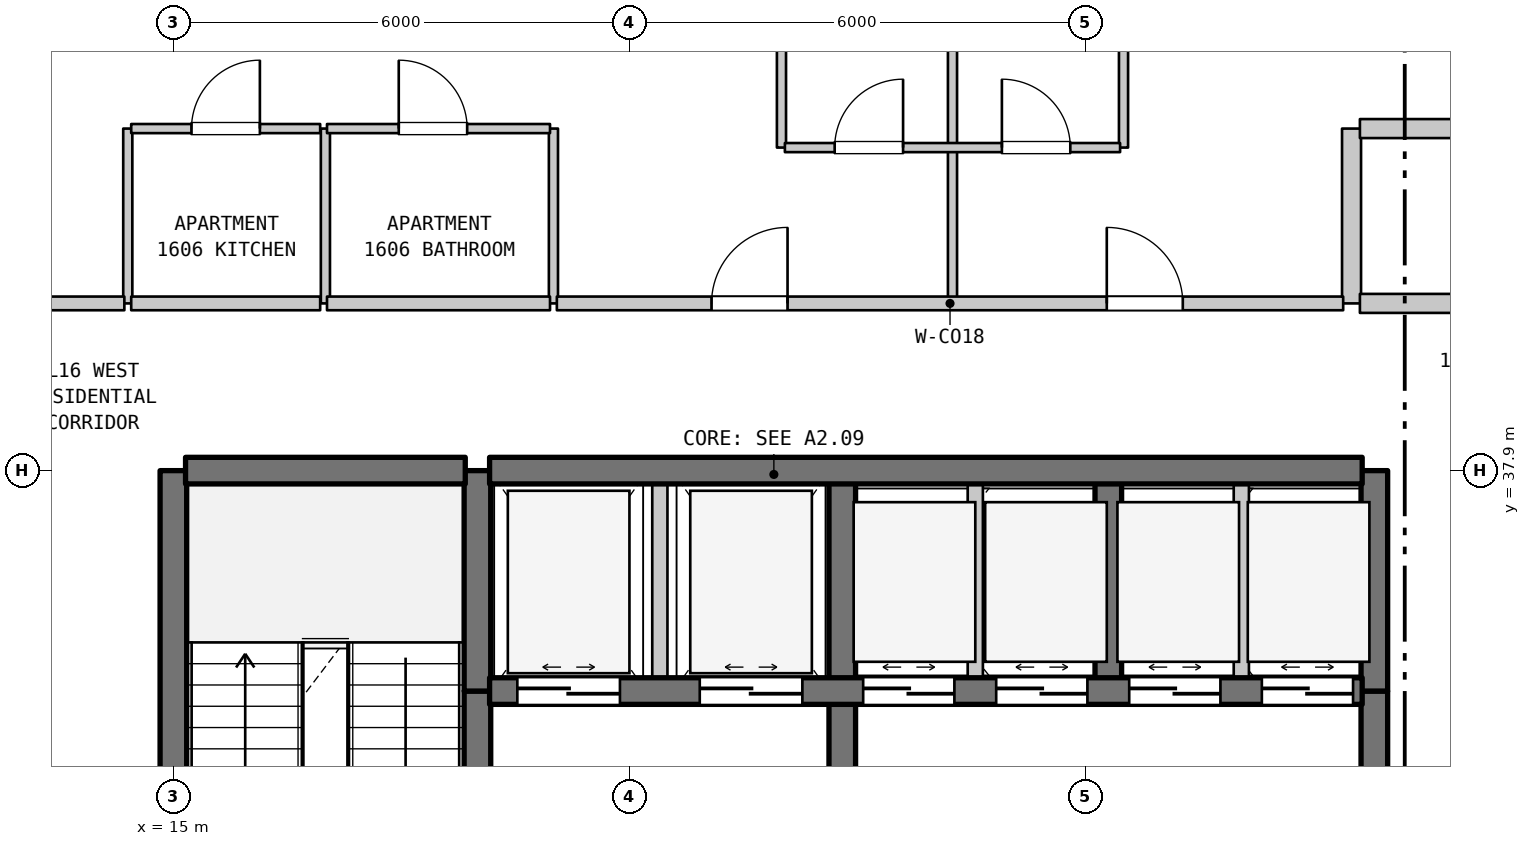
"""IFC4 building model, lengths in metres.
Left out: names, types, materials, properties, quantities, classifications, styles, units other than length and angle.
Written with IfcOpenShell. Run it as: python <this file> out.ifc"""

import sys

from ifc_helpers import new_model, si_unit, direction, frame, frame_2d, origin, place, context, subcontext, project, spatial, rectangle, extrude, element, fill, save


model = new_model("IFC4")
c1 = context("Model", 3, precision=1e-05, world=origin(), true_north=direction((0.0, 1.0)))
c2 = subcontext(c1, "Body", "Model", "MODEL_VIEW")
j1 = project(units=[si_unit("LENGTHUNIT", "METRE"), si_unit("PLANEANGLEUNIT", "RADIAN")], contexts=[c1])
p1 = place(None, origin())
s1 = spatial("IfcSite", under=j1, at=p1, CompositionType="ELEMENT")
p2 = place(p1, origin())
s2 = spatial("IfcBuilding", under=s1, at=p2, CompositionType="ELEMENT")
p3 = place(p2, frame((0.0, 0.0, 70.1)))
s3 = spatial("IfcBuildingStorey", under=s2, at=p3, CompositionType="ELEMENT", Elevation=70.1)
p4 = place(p3, frame((14.4, 40.1, 0.0), z_axis=(0.0, 0.0, 1.0), x_axis=(0.0, 1.0, 0.0)))
e1 = element("IfcWall", 1, at=p4, inside=s3, PredefinedType="PARTITIONING", context=c2, shape_type="SweptSolid", body=[
    extrude(rectangle(XDim=2.3, YDim=0.12, at=frame_2d((1.15, 0.0))), origin(), (0.0, 0.0, 1.0), 3.385),
])
p5 = place(p3, frame((15.0, 31.1, 0.0), z_axis=(0.0, 0.0, 1.0), x_axis=(0.0, 1.0, 0.0)))
e2 = element("IfcWall", 2, at=p5, inside=s3, PredefinedType="SHEAR", context=c2, shape_type="SweptSolid", body=[
    extrude(rectangle(XDim=6.8, YDim=0.35, at=frame_2d((3.4, 0.0))), origin(), (0.0, 0.0, 1.0), 3.385),
])
p6 = place(p3, frame((17.0, 40.1, 0.0), z_axis=(0.0, 0.0, 1.0), x_axis=(0.0, 1.0, 0.0)))
e3 = element("IfcWall", 3, at=p6, inside=s3, PredefinedType="PARTITIONING", context=c2, shape_type="SweptSolid", body=[
    extrude(rectangle(XDim=2.3, YDim=0.12, at=frame_2d((1.15, 0.0))), origin(), (0.0, 0.0, 1.0), 3.385),
])
p7 = place(p3, frame((19.0, 29.5, 0.0), z_axis=(0.0, 0.0, 1.0), x_axis=(0.0, 1.0, 0.0)))
e4 = element("IfcWall", 4, at=p7, inside=s3, PredefinedType="SHEAR", context=c2, shape_type="SweptSolid", body=[
    extrude(rectangle(XDim=5.5, YDim=0.35, at=frame_2d((2.75, 0.0))), origin(), (0.0, 0.0, 1.0), 3.385),
])
p8 = place(p7, frame((2.025, 0.0, 0.0)))
e5 = element("IfcOpeningElement", 5, at=p8, cuts=e4, PredefinedType="OPENING", context=c2, shape_type="SweptSolid", body=[
    extrude(rectangle(XDim=1.1, YDim=2.15, at=frame_2d((0.55, 1.075))), frame((0.0, 0.185, 0.0), z_axis=(0.0, -1.0, 0.0), x_axis=(1.0, 0.0, 0.0)), (0.0, 0.0, 1.0), 0.37),
])
p9 = place(p3, frame((19.0, 35.0, 0.0), z_axis=(0.0, 0.0, 1.0), x_axis=(0.0, 1.0, 0.0)))
e6 = element("IfcWall", 6, at=p9, inside=s3, PredefinedType="SHEAR", context=c2, shape_type="SweptSolid", body=[
    extrude(rectangle(XDim=2.9, YDim=0.35, at=frame_2d((1.45, 0.0))), origin(), (0.0, 0.0, 1.0), 3.385),
])
p10 = place(p3, frame((20.0, 40.1, 0.0), z_axis=(0.0, 0.0, 1.0), x_axis=(0.0, 1.0, 0.0)))
e7 = element("IfcWall", 7, at=p10, inside=s3, PredefinedType="PARTITIONING", context=c2, shape_type="SweptSolid", body=[
    extrude(rectangle(XDim=2.3, YDim=0.12, at=frame_2d((1.15, 0.0))), origin(), (0.0, 0.0, 1.0), 3.385),
])
p11 = place(p3, frame((21.4, 35.0, 0.0), z_axis=(0.0, 0.0, 1.0), x_axis=(0.0, 1.0, 0.0)))
e8 = element("IfcWall", 8, at=p11, inside=s3, PredefinedType="STANDARD", context=c2, shape_type="SweptSolid", body=[
    extrude(rectangle(XDim=2.9, YDim=0.2, at=frame_2d((1.45, 0.0))), origin(), (0.0, 0.0, 1.0), 3.385),
])
p12 = place(p3, frame((23.0, 42.15, 0.0), z_axis=(0.0, 0.0, 1.0), x_axis=(0.0, 1.0, 0.0)))
e9 = element("IfcWall", 9, at=p12, inside=s3, PredefinedType="PARTITIONING", context=c2, shape_type="SweptSolid", body=[
    extrude(rectangle(XDim=11.74, YDim=0.12, at=frame_2d((5.87, 0.0))), origin(), (0.0, 0.0, 1.0), 3.385),
])
p13 = place(p3, frame((23.8, 31.5, 0.0), z_axis=(0.0, 0.0, 1.0), x_axis=(0.0, 1.0, 0.0)))
e10 = element("IfcWall", 10, at=p13, inside=s3, PredefinedType="SHEAR", context=c2, shape_type="SweptSolid", body=[
    extrude(rectangle(XDim=3.5, YDim=0.35, at=frame_2d((1.75, 0.0))), origin(), (0.0, 0.0, 1.0), 3.385),
])
p14 = place(p13, frame((1.127, 0.0, 0.0)))
e11 = element("IfcOpeningElement", 11, at=p14, cuts=e10, PredefinedType="OPENING", context=c2, shape_type="SweptSolid", body=[
    extrude(rectangle(XDim=1.1, YDim=2.15, at=frame_2d((0.55, 1.075))), frame((0.0, 0.185, 0.0), z_axis=(0.0, -1.0, 0.0), x_axis=(1.0, 0.0, 0.0)), (0.0, 0.0, 1.0), 0.37),
])
p15 = place(p3, frame((23.8, 35.0, 0.0), z_axis=(0.0, 0.0, 1.0), x_axis=(0.0, 1.0, 0.0)))
e12 = element("IfcWall", 12, at=p15, inside=s3, PredefinedType="SHEAR", context=c2, shape_type="SweptSolid", body=[
    extrude(rectangle(XDim=2.9, YDim=0.35, at=frame_2d((1.45, 0.0))), origin(), (0.0, 0.0, 1.0), 3.385),
])
p16 = place(p3, frame((25.25, 40.1, 0.0), z_axis=(0.0, 0.0, 1.0), x_axis=(0.0, 1.0, 0.0)))
e13 = element("IfcWall", 13, at=p16, inside=s3, PredefinedType="PARTITIONING", context=c2, shape_type="SweptSolid", body=[
    extrude(rectangle(XDim=2.05, YDim=0.12, at=frame_2d((1.025, 0.0))), origin(), (0.0, 0.0, 1.0), 3.385),
])
p17 = place(p3, frame((25.25, 42.15, 0.0), z_axis=(0.0, 0.0, 1.0), x_axis=(0.0, 1.0, 0.0)))
e14 = element("IfcWall", 14, at=p17, inside=s3, PredefinedType="PARTITIONING", context=c2, shape_type="SweptSolid", body=[
    extrude(rectangle(XDim=11.74, YDim=0.12, at=frame_2d((5.87, 0.0))), origin(), (0.0, 0.0, 1.0), 3.385),
])
p18 = place(p3, frame((25.55, 35.0, 0.0), z_axis=(0.0, 0.0, 1.0), x_axis=(0.0, 1.0, 0.0)))
e15 = element("IfcWall", 15, at=p18, inside=s3, PredefinedType="STANDARD", context=c2, shape_type="SweptSolid", body=[
    extrude(rectangle(XDim=2.9, YDim=0.2, at=frame_2d((1.45, 0.0))), origin(), (0.0, 0.0, 1.0), 3.385),
])
p19 = place(p3, frame((27.3, 35.0, 0.0), z_axis=(0.0, 0.0, 1.0), x_axis=(0.0, 1.0, 0.0)))
e16 = element("IfcWall", 16, at=p19, inside=s3, PredefinedType="SHEAR", context=c2, shape_type="SweptSolid", body=[
    extrude(rectangle(XDim=2.9, YDim=0.35, at=frame_2d((1.45, 0.0))), origin(), (0.0, 0.0, 1.0), 3.385),
])
p20 = place(p3, frame((27.5, 42.15, 0.0), z_axis=(0.0, 0.0, 1.0), x_axis=(0.0, 1.0, 0.0)))
e17 = element("IfcWall", 17, at=p20, inside=s3, PredefinedType="PARTITIONING", context=c2, shape_type="SweptSolid", body=[
    extrude(rectangle(XDim=11.74, YDim=0.12, at=frame_2d((5.87, 0.0))), origin(), (0.0, 0.0, 1.0), 3.385),
])
p21 = place(p3, frame((29.05, 35.0, 0.0), z_axis=(0.0, 0.0, 1.0), x_axis=(0.0, 1.0, 0.0)))
e18 = element("IfcWall", 18, at=p21, inside=s3, PredefinedType="STANDARD", context=c2, shape_type="SweptSolid", body=[
    extrude(rectangle(XDim=2.9, YDim=0.2, at=frame_2d((1.45, 0.0))), origin(), (0.0, 0.0, 1.0), 3.385),
])
p22 = place(p3, frame((30.5, 40.1, 0.0), z_axis=(0.0, 0.0, 1.0), x_axis=(0.0, 1.0, 0.0)))
e19 = element("IfcWall", 19, at=p22, inside=s3, PredefinedType="STANDARD", context=c2, shape_type="SweptSolid", body=[
    extrude(rectangle(XDim=2.3, YDim=0.25, at=frame_2d((1.15, 0.0))), origin(), (0.0, 0.0, 1.0), 3.385),
])
p23 = place(p3, frame((30.8, 31.5, 0.0), z_axis=(0.0, 0.0, 1.0), x_axis=(0.0, 1.0, 0.0)))
e20 = element("IfcWall", 20, at=p23, inside=s3, PredefinedType="SHEAR", context=c2, shape_type="SweptSolid", body=[
    extrude(rectangle(XDim=3.5, YDim=0.35, at=frame_2d((1.75, 0.0))), origin(), (0.0, 0.0, 1.0), 3.385),
])
p24 = place(p23, frame((1.15, 0.0, 0.0)))
e21 = element("IfcOpeningElement", 21, at=p24, cuts=e20, PredefinedType="OPENING", context=c2, shape_type="SweptSolid", body=[
    extrude(rectangle(XDim=1.2, YDim=2.2, at=frame_2d((0.6, 1.1))), frame((0.0, 0.185, 0.0), z_axis=(0.0, -1.0, 0.0), x_axis=(1.0, 0.0, 0.0)), (0.0, 0.0, 1.0), 0.37),
])
p25 = place(p3, frame((30.8, 35.0, 0.0), z_axis=(0.0, 0.0, 1.0), x_axis=(0.0, 1.0, 0.0)))
e22 = element("IfcWall", 22, at=p25, inside=s3, PredefinedType="SHEAR", context=c2, shape_type="SweptSolid", body=[
    extrude(rectangle(XDim=2.9, YDim=0.35, at=frame_2d((1.45, 0.0))), origin(), (0.0, 0.0, 1.0), 3.385),
])
p26 = place(p3, frame((19.16, 35.0, 0.0), z_axis=(0.0, 0.0, 1.0), x_axis=(1.0, 0.0, 0.0)))
e23 = element("IfcWall", 23, at=p26, inside=s3, PredefinedType="SHEAR", context=c2, shape_type="SweptSolid", body=[
    extrude(rectangle(XDim=11.48, YDim=0.35, at=frame_2d((5.74, 0.0))), origin(), (0.0, 0.0, 1.0), 3.385),
])
p27 = place(p26, frame((0.365, 0.0, 0.0)))
e24 = element("IfcOpeningElement", 24, at=p27, cuts=e23, PredefinedType="OPENING", context=c2, shape_type="SweptSolid", body=[
    extrude(rectangle(XDim=1.35, YDim=2.2, at=frame_2d((0.675, 1.1))), frame((0.0, 0.185, 0.0), z_axis=(0.0, -1.0, 0.0), x_axis=(1.0, 0.0, 0.0)), (0.0, 0.0, 1.0), 0.37),
])
p28 = place(p26, frame((2.765, 0.0, 0.0)))
e25 = element("IfcOpeningElement", 25, at=p28, cuts=e23, PredefinedType="OPENING", context=c2, shape_type="SweptSolid", body=[
    extrude(rectangle(XDim=1.35, YDim=2.2, at=frame_2d((0.675, 1.1))), frame((0.0, 0.185, 0.0), z_axis=(0.0, -1.0, 0.0), x_axis=(1.0, 0.0, 0.0)), (0.0, 0.0, 1.0), 0.37),
])
p29 = place(p26, frame((4.915, 0.0, 0.0)))
e26 = element("IfcOpeningElement", 26, at=p29, cuts=e23, PredefinedType="OPENING", context=c2, shape_type="SweptSolid", body=[
    extrude(rectangle(XDim=1.2, YDim=2.2, at=frame_2d((0.6, 1.1))), frame((0.0, 0.185, 0.0), z_axis=(0.0, -1.0, 0.0), x_axis=(1.0, 0.0, 0.0)), (0.0, 0.0, 1.0), 0.37),
])
p30 = place(p26, frame((6.665, 0.0, 0.0)))
e27 = element("IfcOpeningElement", 27, at=p30, cuts=e23, PredefinedType="OPENING", context=c2, shape_type="SweptSolid", body=[
    extrude(rectangle(XDim=1.2, YDim=2.2, at=frame_2d((0.6, 1.1))), frame((0.0, 0.185, 0.0), z_axis=(0.0, -1.0, 0.0), x_axis=(1.0, 0.0, 0.0)), (0.0, 0.0, 1.0), 0.37),
])
p31 = place(p26, frame((8.415, 0.0, 0.0)))
e28 = element("IfcOpeningElement", 28, at=p31, cuts=e23, PredefinedType="OPENING", context=c2, shape_type="SweptSolid", body=[
    extrude(rectangle(XDim=1.2, YDim=2.2, at=frame_2d((0.6, 1.1))), frame((0.0, 0.185, 0.0), z_axis=(0.0, -1.0, 0.0), x_axis=(1.0, 0.0, 0.0)), (0.0, 0.0, 1.0), 0.37),
])
p32 = place(p26, frame((10.16, 0.0, 0.0)))
e29 = element("IfcOpeningElement", 29, at=p32, cuts=e23, PredefinedType="OPENING", context=c2, shape_type="SweptSolid", body=[
    extrude(rectangle(XDim=1.2, YDim=2.2, at=frame_2d((0.6, 1.1))), frame((0.0, 0.185, 0.0), z_axis=(0.0, -1.0, 0.0), x_axis=(1.0, 0.0, 0.0)), (0.0, 0.0, 1.0), 0.37),
])
p33 = place(p3, frame((15.16, 37.9, 0.0), z_axis=(0.0, 0.0, 1.0), x_axis=(1.0, 0.0, 0.0)))
e30 = element("IfcWall", 30, at=p33, inside=s3, PredefinedType="SHEAR", context=c2, shape_type="SweptSolid", body=[
    extrude(rectangle(XDim=3.68, YDim=0.35, at=frame_2d((1.84, 0.0))), origin(), (0.0, 0.0, 1.0), 3.385),
])
p34 = place(p3, frame((19.16, 37.9, 0.0), z_axis=(0.0, 0.0, 1.0), x_axis=(1.0, 0.0, 0.0)))
e31 = element("IfcWall", 31, at=p34, inside=s3, PredefinedType="SHEAR", context=c2, shape_type="SweptSolid", body=[
    extrude(rectangle(XDim=11.48, YDim=0.35, at=frame_2d((5.74, 0.0))), origin(), (0.0, 0.0, 1.0), 3.385),
])
p35 = place(p3, frame((12.875, 40.1, 0.0), z_axis=(0.0, 0.0, 1.0), x_axis=(1.0, 0.0, 0.0)))
e32 = element("IfcWall", 32, at=p35, inside=s3, PredefinedType="STANDARD", context=c2, shape_type="SweptSolid", body=[
    extrude(rectangle(XDim=1.48, YDim=0.18, at=frame_2d((0.74, 0.0))), origin(), (0.0, 0.0, 1.0), 3.385),
])
p36 = place(p3, frame((14.445, 40.1, 0.0), z_axis=(0.0, 0.0, 1.0), x_axis=(1.0, 0.0, 0.0)))
e33 = element("IfcWall", 33, at=p36, inside=s3, PredefinedType="STANDARD", context=c2, shape_type="SweptSolid", body=[
    extrude(rectangle(XDim=2.486, YDim=0.18, at=frame_2d((1.243, 0.0))), origin(), (0.0, 0.0, 1.0), 3.385),
])
p37 = place(p3, frame((17.021, 40.1, 0.0), z_axis=(0.0, 0.0, 1.0), x_axis=(1.0, 0.0, 0.0)))
e34 = element("IfcWall", 34, at=p37, inside=s3, PredefinedType="STANDARD", context=c2, shape_type="SweptSolid", body=[
    extrude(rectangle(XDim=2.934, YDim=0.18, at=frame_2d((1.467, 0.0))), origin(), (0.0, 0.0, 1.0), 3.385),
])
p38 = place(p3, frame((20.045, 40.1, 0.0), z_axis=(0.0, 0.0, 1.0), x_axis=(1.0, 0.0, 0.0)))
e35 = element("IfcWall", 35, at=p38, inside=s3, PredefinedType="STANDARD", context=c2, shape_type="SweptSolid", body=[
    extrude(rectangle(XDim=10.345, YDim=0.18, at=frame_2d((5.172, 0.0))), origin(), (0.0, 0.0, 1.0), 3.385),
])
p39 = place(p38, frame((2.035, 0.0, 0.0)))
e36 = element("IfcOpeningElement", 36, at=p39, cuts=e35, PredefinedType="OPENING", context=c2, shape_type="SweptSolid", body=[
    extrude(rectangle(XDim=1.0, YDim=2.15, at=frame_2d((0.5, 1.075))), frame((0.0, 0.1, 0.0), z_axis=(0.0, -1.0, 0.0), x_axis=(1.0, 0.0, 0.0)), (0.0, 0.0, 1.0), 0.2),
])
p40 = place(p38, frame((7.235, 0.0, 0.0)))
e37 = element("IfcOpeningElement", 37, at=p40, cuts=e35, PredefinedType="OPENING", context=c2, shape_type="SweptSolid", body=[
    extrude(rectangle(XDim=1.0, YDim=2.15, at=frame_2d((0.5, 1.075))), frame((0.0, 0.1, 0.0), z_axis=(0.0, -1.0, 0.0), x_axis=(1.0, 0.0, 0.0)), (0.0, 0.0, 1.0), 0.2),
])
p41 = place(p3, frame((30.61, 40.1, 0.0), z_axis=(0.0, 0.0, 1.0), x_axis=(1.0, 0.0, 0.0)))
e38 = element("IfcWall", 38, at=p41, inside=s3, PredefinedType="STANDARD", context=c2, shape_type="SweptSolid", body=[
    extrude(rectangle(XDim=3.486, YDim=0.25, at=frame_2d((1.743, 0.0))), origin(), (0.0, 0.0, 1.0), 3.385),
])
p42 = place(p3, frame((23.045, 42.15, 0.0), z_axis=(0.0, 0.0, 1.0), x_axis=(1.0, 0.0, 0.0)))
e39 = element("IfcWall", 39, at=p42, inside=s3, PredefinedType="PARTITIONING", context=c2, shape_type="SweptSolid", body=[
    extrude(rectangle(XDim=4.41, YDim=0.12, at=frame_2d((2.205, 0.0))), origin(), (0.0, 0.0, 1.0), 3.385),
])
p43 = place(p42, frame((0.655, 0.0, 0.0)))
e40 = element("IfcOpeningElement", 40, at=p43, cuts=e39, PredefinedType="OPENING", context=c2, shape_type="SweptSolid", body=[
    extrude(rectangle(XDim=0.9, YDim=2.15, at=frame_2d((0.45, 1.075))), frame((0.0, 0.07, 0.0), z_axis=(0.0, -1.0, 0.0), x_axis=(1.0, 0.0, 0.0)), (0.0, 0.0, 1.0), 0.14),
])
p44 = place(p42, frame((2.855, 0.0, 0.0)))
e41 = element("IfcOpeningElement", 41, at=p44, cuts=e39, PredefinedType="OPENING", context=c2, shape_type="SweptSolid", body=[
    extrude(rectangle(XDim=0.9, YDim=2.15, at=frame_2d((0.45, 1.075))), frame((0.0, 0.07, 0.0), z_axis=(0.0, -1.0, 0.0), x_axis=(1.0, 0.0, 0.0)), (0.0, 0.0, 1.0), 0.14),
])
p45 = place(p3, frame((14.445, 42.4, 0.0), z_axis=(0.0, 0.0, 1.0), x_axis=(1.0, 0.0, 0.0)))
e42 = element("IfcWall", 42, at=p45, inside=s3, PredefinedType="PARTITIONING", context=c2, shape_type="SweptSolid", body=[
    extrude(rectangle(XDim=2.486, YDim=0.12, at=frame_2d((1.243, 0.0))), origin(), (0.0, 0.0, 1.0), 3.385),
])
p46 = place(p45, frame((0.793, 0.0, 0.0)))
e43 = element("IfcOpeningElement", 43, at=p46, cuts=e42, PredefinedType="OPENING", context=c2, shape_type="SweptSolid", body=[
    extrude(rectangle(XDim=0.9, YDim=2.15, at=frame_2d((0.45, 1.075))), frame((0.0, 0.07, 0.0), z_axis=(0.0, -1.0, 0.0), x_axis=(1.0, 0.0, 0.0)), (0.0, 0.0, 1.0), 0.14),
])
p47 = place(p3, frame((17.021, 42.4, 0.0), z_axis=(0.0, 0.0, 1.0), x_axis=(1.0, 0.0, 0.0)))
e44 = element("IfcWall", 44, at=p47, inside=s3, PredefinedType="PARTITIONING", context=c2, shape_type="SweptSolid", body=[
    extrude(rectangle(XDim=2.934, YDim=0.12, at=frame_2d((1.467, 0.0))), origin(), (0.0, 0.0, 1.0), 3.385),
])
p48 = place(p47, frame((0.944, 0.0, 0.0)))
e45 = element("IfcOpeningElement", 45, at=p48, cuts=e44, PredefinedType="OPENING", context=c2, shape_type="SweptSolid", body=[
    extrude(rectangle(XDim=0.9, YDim=2.1, at=frame_2d((0.45, 1.05))), frame((0.0, 0.07, 0.0), z_axis=(0.0, -1.0, 0.0), x_axis=(1.0, 0.0, 0.0)), (0.0, 0.0, 1.0), 0.14),
])
p49 = place(p3, frame((30.61, 42.4, 0.0), z_axis=(0.0, 0.0, 1.0), x_axis=(1.0, 0.0, 0.0)))
e46 = element("IfcWall", 46, at=p49, inside=s3, PredefinedType="STANDARD", context=c2, shape_type="SweptSolid", body=[
    extrude(rectangle(XDim=3.486, YDim=0.25, at=frame_2d((1.743, 0.0))), origin(), (0.0, 0.0, 1.0), 3.385),
])
p50 = place(p49, frame((1.268, 0.0, 0.0)))
e47 = element("IfcOpeningElement", 47, at=p50, cuts=e46, PredefinedType="OPENING", context=c2, shape_type="SweptSolid", body=[
    extrude(rectangle(XDim=0.95, YDim=2.15, at=frame_2d((0.475, 1.075))), frame((0.0, 0.135, 0.0), z_axis=(0.0, -1.0, 0.0), x_axis=(1.0, 0.0, 0.0)), (0.0, 0.0, 1.0), 0.27),
])
p51 = place(p27, origin())
e48 = element("IfcDoor", 48, at=p51, inside=s3, OperationType="DOUBLE_DOOR_SLIDING", PredefinedType="DOOR", context=c2, shape_type="SweptSolid", body=[
    extrude(rectangle(XDim=1.35, YDim=2.2, at=frame_2d((0.675, 1.1))), frame((0.0, 0.025, 0.0), z_axis=(0.0, -1.0, 0.0), x_axis=(1.0, 0.0, 0.0)), (0.0, 0.0, 1.0), 0.05),
])
fill(e24, e48)
p52 = place(p28, origin())
e49 = element("IfcDoor", 49, at=p52, inside=s3, OperationType="DOUBLE_DOOR_SLIDING", PredefinedType="DOOR", context=c2, shape_type="SweptSolid", body=[
    extrude(rectangle(XDim=1.35, YDim=2.2, at=frame_2d((0.675, 1.1))), frame((0.0, 0.025, 0.0), z_axis=(0.0, -1.0, 0.0), x_axis=(1.0, 0.0, 0.0)), (0.0, 0.0, 1.0), 0.05),
])
fill(e25, e49)
p53 = place(p29, origin())
e50 = element("IfcDoor", 50, at=p53, inside=s3, OperationType="DOUBLE_DOOR_SLIDING", PredefinedType="DOOR", context=c2, shape_type="SweptSolid", body=[
    extrude(rectangle(XDim=1.2, YDim=2.2, at=frame_2d((0.6, 1.1))), frame((0.0, 0.025, 0.0), z_axis=(0.0, -1.0, 0.0), x_axis=(1.0, 0.0, 0.0)), (0.0, 0.0, 1.0), 0.05),
])
fill(e26, e50)
p54 = place(p30, origin())
e51 = element("IfcDoor", 51, at=p54, inside=s3, OperationType="DOUBLE_DOOR_SLIDING", PredefinedType="DOOR", context=c2, shape_type="SweptSolid", body=[
    extrude(rectangle(XDim=1.2, YDim=2.2, at=frame_2d((0.6, 1.1))), frame((0.0, 0.025, 0.0), z_axis=(0.0, -1.0, 0.0), x_axis=(1.0, 0.0, 0.0)), (0.0, 0.0, 1.0), 0.05),
])
fill(e27, e51)
p55 = place(p31, origin())
e52 = element("IfcDoor", 52, at=p55, inside=s3, OperationType="DOUBLE_DOOR_SLIDING", PredefinedType="DOOR", context=c2, shape_type="SweptSolid", body=[
    extrude(rectangle(XDim=1.2, YDim=2.2, at=frame_2d((0.6, 1.1))), frame((0.0, 0.025, 0.0), z_axis=(0.0, -1.0, 0.0), x_axis=(1.0, 0.0, 0.0)), (0.0, 0.0, 1.0), 0.05),
])
fill(e28, e52)
p56 = place(p32, origin())
e53 = element("IfcDoor", 53, at=p56, inside=s3, OperationType="DOUBLE_DOOR_SLIDING", PredefinedType="DOOR", context=c2, shape_type="SweptSolid", body=[
    extrude(rectangle(XDim=1.2, YDim=2.2, at=frame_2d((0.6, 1.1))), frame((0.0, 0.025, 0.0), z_axis=(0.0, -1.0, 0.0), x_axis=(1.0, 0.0, 0.0)), (0.0, 0.0, 1.0), 0.05),
])
fill(e29, e53)
p57 = place(p39, origin())
e54 = element("IfcDoor", 54, at=p57, inside=s3, OperationType="SINGLE_SWING_RIGHT", PredefinedType="DOOR", context=c2, shape_type="SweptSolid", body=[
    extrude(rectangle(XDim=1.0, YDim=2.15, at=frame_2d((0.5, 1.075))), frame((0.0, 0.025, 0.0), z_axis=(0.0, -1.0, 0.0), x_axis=(1.0, 0.0, 0.0)), (0.0, 0.0, 1.0), 0.05),
])
fill(e36, e54)
p58 = place(p40, origin())
e55 = element("IfcDoor", 55, at=p58, inside=s3, OperationType="SINGLE_SWING_LEFT", PredefinedType="DOOR", context=c2, shape_type="SweptSolid", body=[
    extrude(rectangle(XDim=1.0, YDim=2.15, at=frame_2d((0.5, 1.075))), frame((0.0, 0.025, 0.0), z_axis=(0.0, -1.0, 0.0), x_axis=(1.0, 0.0, 0.0)), (0.0, 0.0, 1.0), 0.05),
])
fill(e37, e55)
p59 = place(p43, origin())
e56 = element("IfcDoor", 56, at=p59, inside=s3, OperationType="SINGLE_SWING_RIGHT", PredefinedType="DOOR", context=c2, shape_type="SweptSolid", body=[
    extrude(rectangle(XDim=0.9, YDim=2.15, at=frame_2d((0.45, 1.075))), frame((0.0, 0.025, 0.0), z_axis=(0.0, -1.0, 0.0), x_axis=(1.0, 0.0, 0.0)), (0.0, 0.0, 1.0), 0.05),
])
fill(e40, e56)
p60 = place(p44, origin())
e57 = element("IfcDoor", 57, at=p60, inside=s3, OperationType="SINGLE_SWING_LEFT", PredefinedType="DOOR", context=c2, shape_type="SweptSolid", body=[
    extrude(rectangle(XDim=0.9, YDim=2.15, at=frame_2d((0.45, 1.075))), frame((0.0, 0.025, 0.0), z_axis=(0.0, -1.0, 0.0), x_axis=(1.0, 0.0, 0.0)), (0.0, 0.0, 1.0), 0.05),
])
fill(e41, e57)
p61 = place(p46, origin())
e58 = element("IfcDoor", 58, at=p61, inside=s3, OperationType="SINGLE_SWING_RIGHT", PredefinedType="DOOR", context=c2, shape_type="SweptSolid", body=[
    extrude(rectangle(XDim=0.9, YDim=2.15, at=frame_2d((0.45, 1.075))), frame((0.0, 0.025, 0.0), z_axis=(0.0, -1.0, 0.0), x_axis=(1.0, 0.0, 0.0)), (0.0, 0.0, 1.0), 0.05),
])
fill(e43, e58)
p62 = place(p48, origin())
e59 = element("IfcDoor", 59, at=p62, inside=s3, OperationType="SINGLE_SWING_LEFT", PredefinedType="DOOR", context=c2, shape_type="SweptSolid", body=[
    extrude(rectangle(XDim=0.9, YDim=2.1, at=frame_2d((0.45, 1.05))), frame((0.0, 0.025, 0.0), z_axis=(0.0, -1.0, 0.0), x_axis=(1.0, 0.0, 0.0)), (0.0, 0.0, 1.0), 0.05),
])
fill(e45, e59)
save(model, sys.argv[1])
